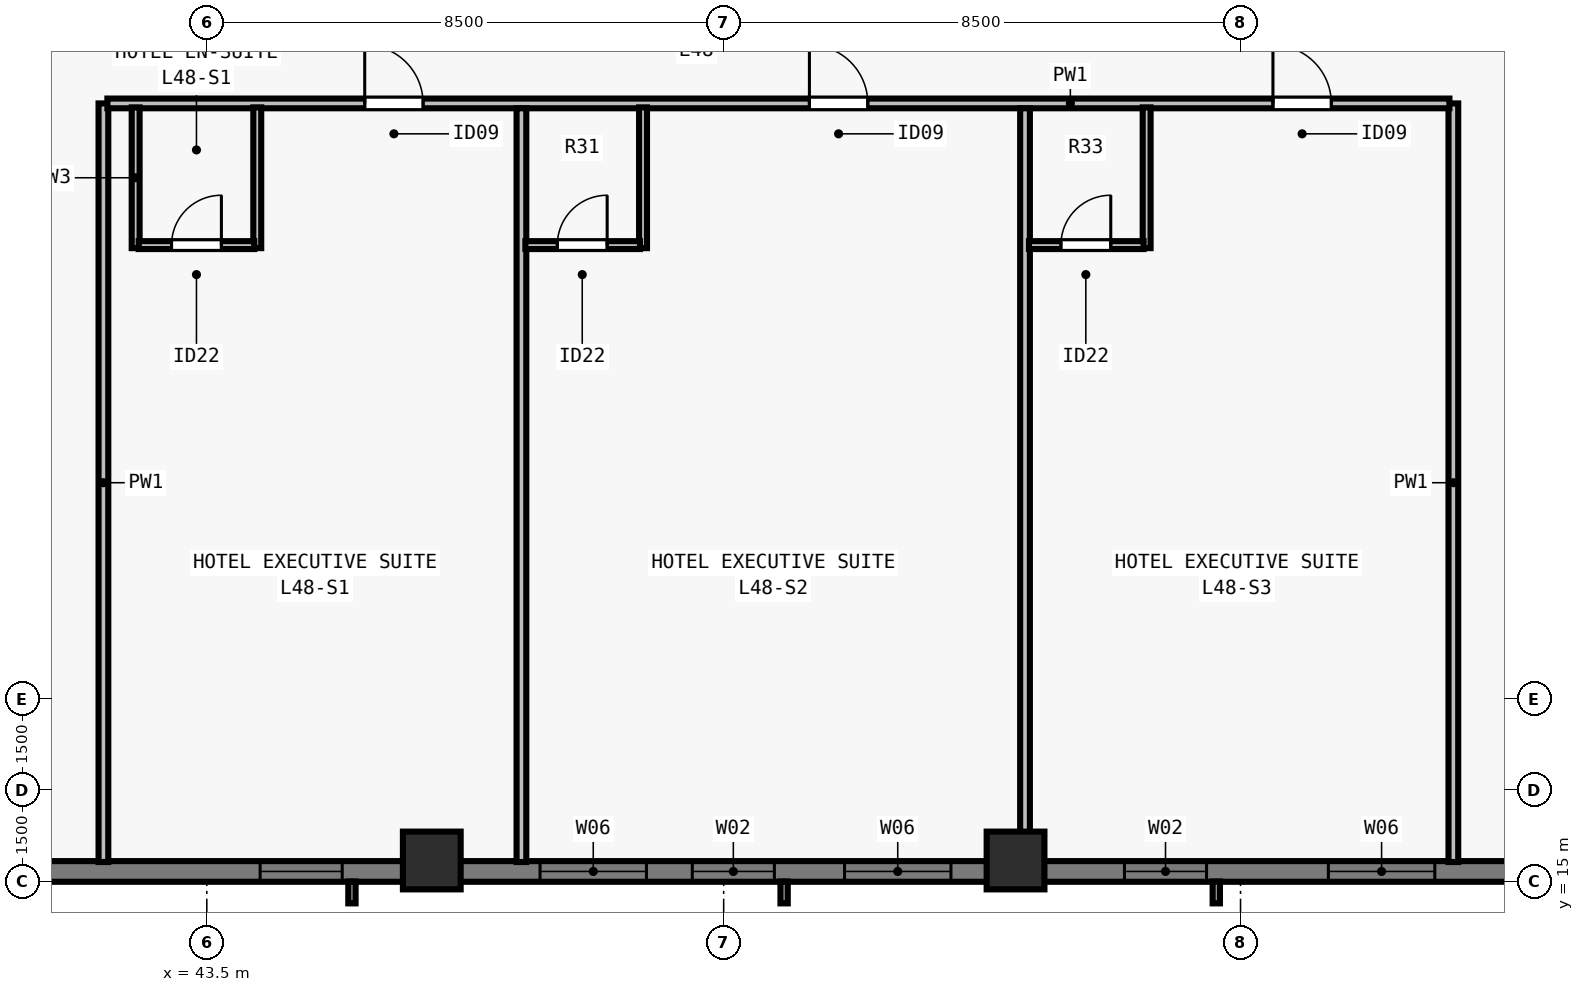
"""IFC4 building model, lengths in metres.
Left out: names, types, materials, properties, quantities, classifications, styles, units other than length and angle.
Written with IfcOpenShell. Run it as: python <this file> out.ifc"""

import sys

from ifc_helpers import new_model, si_unit, direction, frame, frame_2d, origin, origin_2d, place, context, subcontext, project, spatial, rectangle, extrude, element, fill, save


model = new_model("IFC4")
c1 = context("Model", 3, precision=1e-05, world=origin(), true_north=direction((0.0, 1.0)))
c2 = subcontext(c1, "Body", "Model", "MODEL_VIEW")
j1 = project(units=[si_unit("LENGTHUNIT", "METRE"), si_unit("PLANEANGLEUNIT", "RADIAN")], contexts=[c1])
p1 = place(None, origin())
s1 = spatial("IfcSite", under=j1, at=p1, CompositionType="ELEMENT")
p2 = place(p1, origin())
s2 = spatial("IfcBuilding", under=s1, at=p2, CompositionType="ELEMENT")
p3 = place(p2, frame((0.0, 0.0, 176.0)))
s3 = spatial("IfcBuildingStorey", under=s2, at=p3, CompositionType="ELEMENT", Elevation=176.0)
for number, where, z_axis, x_axis in (
    (1, (47.2, 15.35, 0.0), (0.0, 0.0, 1.0), (1.0, 0.0, 0.0)),
    (2, (56.8, 15.35, 0.0), (0.0, 0.0, 1.0), (1.0, 0.0, 0.0)),
):
    element("IfcColumn", number, at=place(p3, frame(where, z_axis=z_axis, x_axis=x_axis)), inside=s3, PredefinedType="COLUMN", context=c2, shape_type="SweptSolid", body=[
        extrude(rectangle(XDim=0.95, YDim=0.95, at=origin_2d()), origin(), (0.0, 0.0, 1.0), 3.5),
    ])
p4 = place(p3, frame((72.0, 15.17, 0.0), z_axis=(0.0, 0.0, 1.0), x_axis=(-1.0, 0.0, 0.0)))
e3 = element("IfcWall", 3, at=p4, inside=s3, PredefinedType="SOLIDWALL", context=c2, shape_type="SweptSolid", body=[
    extrude(rectangle(XDim=39.682, YDim=0.34, at=frame_2d((19.841, 0.0))), origin(), (0.0, 0.0, 1.0), 3.28),
])
p5 = place(p4, frame((4.102, 0.0, 0.8)))
e4 = element("IfcOpeningElement", 4, at=p5, cuts=e3, PredefinedType="OPENING", context=c2, shape_type="SweptSolid", body=[
    extrude(rectangle(XDim=1.35, YDim=1.66, at=frame_2d((0.675, 0.83))), frame((0.0, 0.18, 0.0), z_axis=(0.0, -1.0, 0.0), x_axis=(1.0, 0.0, 0.0)), (0.0, 0.0, 1.0), 0.36),
])
p6 = place(p4, frame((8.305, 0.0, 0.8)))
e5 = element("IfcOpeningElement", 5, at=p6, cuts=e3, PredefinedType="OPENING", context=c2, shape_type="SweptSolid", body=[
    extrude(rectangle(XDim=1.75, YDim=1.66, at=frame_2d((0.875, 0.83))), frame((0.0, 0.18, 0.0), z_axis=(0.0, -1.0, 0.0), x_axis=(1.0, 0.0, 0.0)), (0.0, 0.0, 1.0), 0.36),
])
p7 = place(p4, frame((12.059, 0.0, 0.8)))
e6 = element("IfcOpeningElement", 6, at=p7, cuts=e3, PredefinedType="OPENING", context=c2, shape_type="SweptSolid", body=[
    extrude(rectangle(XDim=1.35, YDim=1.66, at=frame_2d((0.675, 0.83))), frame((0.0, 0.18, 0.0), z_axis=(0.0, -1.0, 0.0), x_axis=(1.0, 0.0, 0.0)), (0.0, 0.0, 1.0), 0.36),
])
p8 = place(p4, frame((16.262, 0.0, 0.8)))
e7 = element("IfcOpeningElement", 7, at=p8, cuts=e3, PredefinedType="OPENING", context=c2, shape_type="SweptSolid", body=[
    extrude(rectangle(XDim=1.75, YDim=1.66, at=frame_2d((0.875, 0.83))), frame((0.0, 0.18, 0.0), z_axis=(0.0, -1.0, 0.0), x_axis=(1.0, 0.0, 0.0)), (0.0, 0.0, 1.0), 0.36),
])
p9 = place(p4, frame((19.166, 0.0, 0.8)))
e8 = element("IfcOpeningElement", 8, at=p9, cuts=e3, PredefinedType="OPENING", context=c2, shape_type="SweptSolid", body=[
    extrude(rectangle(XDim=1.35, YDim=1.66, at=frame_2d((0.675, 0.83))), frame((0.0, 0.18, 0.0), z_axis=(0.0, -1.0, 0.0), x_axis=(1.0, 0.0, 0.0)), (0.0, 0.0, 1.0), 0.36),
])
p10 = place(p4, frame((21.27, 0.0, 0.8)))
e9 = element("IfcOpeningElement", 9, at=p10, cuts=e3, PredefinedType="OPENING", context=c2, shape_type="SweptSolid", body=[
    extrude(rectangle(XDim=1.75, YDim=1.66, at=frame_2d((0.875, 0.83))), frame((0.0, 0.18, 0.0), z_axis=(0.0, -1.0, 0.0), x_axis=(1.0, 0.0, 0.0)), (0.0, 0.0, 1.0), 0.36),
])
p11 = place(p4, frame((26.273, 0.0, 0.8)))
e10 = element("IfcOpeningElement", 10, at=p11, cuts=e3, PredefinedType="OPENING", context=c2, shape_type="SweptSolid", body=[
    extrude(rectangle(XDim=1.35, YDim=1.66, at=frame_2d((0.675, 0.83))), frame((0.0, 0.18, 0.0), z_axis=(0.0, -1.0, 0.0), x_axis=(1.0, 0.0, 0.0)), (0.0, 0.0, 1.0), 0.36),
])
p12 = place(p4, frame((32.93, 0.0, 0.8)))
e11 = element("IfcOpeningElement", 11, at=p12, cuts=e3, PredefinedType="OPENING", context=c2, shape_type="SweptSolid", body=[
    extrude(rectangle(XDim=1.35, YDim=1.66, at=frame_2d((0.675, 0.83))), frame((0.0, 0.18, 0.0), z_axis=(0.0, -1.0, 0.0), x_axis=(1.0, 0.0, 0.0)), (0.0, 0.0, 1.0), 0.36),
])
p13 = place(p3, frame((41.8, 15.325, 0.0), z_axis=(0.0, 0.0, 1.0), x_axis=(0.0, 1.0, 0.0)))
e12 = element("IfcWall", 12, at=p13, inside=s3, PredefinedType="PARTITIONING", context=c2, shape_type="SweptSolid", body=[
    extrude(rectangle(XDim=12.475, YDim=0.16, at=frame_2d((6.238, 0.0))), origin(), (0.0, 0.0, 1.0), 3.28),
])
p14 = place(p3, frame((64.0, 15.325, 0.0), z_axis=(0.0, 0.0, 1.0), x_axis=(0.0, 1.0, 0.0)))
e13 = element("IfcWall", 13, at=p14, inside=s3, PredefinedType="PARTITIONING", context=c2, shape_type="SweptSolid", body=[
    extrude(rectangle(XDim=12.475, YDim=0.16, at=frame_2d((6.238, 0.0))), origin(), (0.0, 0.0, 1.0), 2.555),
])
p15 = place(p3, frame((41.865, 27.8, 0.0), z_axis=(0.0, 0.0, 1.0), x_axis=(1.0, 0.0, 0.0)))
e14 = element("IfcWall", 14, at=p15, inside=s3, PredefinedType="PARTITIONING", context=c2, shape_type="SweptSolid", body=[
    extrude(rectangle(XDim=22.07, YDim=0.16, at=frame_2d((11.035, 0.0))), origin(), (0.0, 0.0, 1.0), 3.28),
])
p16 = place(p15, frame((4.232, 0.0, 0.0)))
e15 = element("IfcOpeningElement", 15, at=p16, cuts=e14, PredefinedType="OPENING", context=c2, shape_type="SweptSolid", body=[
    extrude(rectangle(XDim=0.96, YDim=2.15, at=frame_2d((0.48, 1.075))), frame((0.0, 0.09, 0.0), z_axis=(0.0, -1.0, 0.0), x_axis=(1.0, 0.0, 0.0)), (0.0, 0.0, 1.0), 0.18),
])
p17 = place(p15, frame((11.545, 0.0, 0.0)))
e16 = element("IfcOpeningElement", 16, at=p17, cuts=e14, PredefinedType="OPENING", context=c2, shape_type="SweptSolid", body=[
    extrude(rectangle(XDim=0.96, YDim=2.15, at=frame_2d((0.48, 1.075))), frame((0.0, 0.09, 0.0), z_axis=(0.0, -1.0, 0.0), x_axis=(1.0, 0.0, 0.0)), (0.0, 0.0, 1.0), 0.18),
])
p18 = place(p15, frame((19.168, 0.0, 0.0)))
e17 = element("IfcOpeningElement", 17, at=p18, cuts=e14, PredefinedType="OPENING", context=c2, shape_type="SweptSolid", body=[
    extrude(rectangle(XDim=0.96, YDim=2.15, at=frame_2d((0.48, 1.075))), frame((0.0, 0.09, 0.0), z_axis=(0.0, -1.0, 0.0), x_axis=(1.0, 0.0, 0.0)), (0.0, 0.0, 1.0), 0.18),
])
for number, where, z_axis, x_axis in (
    (18, (42.33, 25.42, 0.0), (0.0, 0.0, 1.0), (0.0, 1.0, 0.0)),
    (19, (44.33, 25.42, 0.0), (0.0, 0.0, 1.0), (0.0, 1.0, 0.0)),
):
    element("IfcWall", number, at=place(p3, frame(where, z_axis=z_axis, x_axis=x_axis)), inside=s3, PredefinedType="PLUMBINGWALL", context=c2, shape_type="SweptSolid", body=[
        extrude(rectangle(XDim=2.315, YDim=0.13, at=frame_2d((1.158, 0.0))), origin(), (0.0, 0.0, 1.0), 3.28),
    ])
p19 = place(p3, frame((42.38, 25.47, 0.0), z_axis=(0.0, 0.0, 1.0), x_axis=(1.0, 0.0, 0.0)))
e20 = element("IfcWall", 20, at=p19, inside=s3, PredefinedType="PLUMBINGWALL", context=c2, shape_type="SweptSolid", body=[
    extrude(rectangle(XDim=1.9, YDim=0.13, at=frame_2d((0.95, 0.0))), origin(), (0.0, 0.0, 1.0), 3.28),
])
p20 = place(p19, frame((0.54, 0.0, 0.0)))
e21 = element("IfcOpeningElement", 21, at=p20, cuts=e20, PredefinedType="OPENING", context=c2, shape_type="SweptSolid", body=[
    extrude(rectangle(XDim=0.82, YDim=2.1, at=frame_2d((0.41, 1.05))), frame((0.0, 0.075, 0.0), z_axis=(0.0, -1.0, 0.0), x_axis=(1.0, 0.0, 0.0)), (0.0, 0.0, 1.0), 0.15),
])
p21 = place(p3, frame((48.674, 15.325, 0.0), z_axis=(0.0, 0.0, 1.0), x_axis=(0.0, 1.0, 0.0)))
e22 = element("IfcWall", 22, at=p21, inside=s3, PredefinedType="PARTITIONING", context=c2, shape_type="SweptSolid", body=[
    extrude(rectangle(XDim=12.395, YDim=0.16, at=frame_2d((6.198, 0.0))), origin(), (0.0, 0.0, 1.0), 2.896),
])
p22 = place(p3, frame((50.674, 25.42, 0.0), z_axis=(0.0, 0.0, 1.0), x_axis=(0.0, 1.0, 0.0)))
e23 = element("IfcWall", 23, at=p22, inside=s3, PredefinedType="PLUMBINGWALL", context=c2, shape_type="SweptSolid", body=[
    extrude(rectangle(XDim=2.315, YDim=0.13, at=frame_2d((1.158, 0.0))), origin(), (0.0, 0.0, 1.0), 3.28),
])
p23 = place(p3, frame((48.739, 25.47, 0.0), z_axis=(0.0, 0.0, 1.0), x_axis=(1.0, 0.0, 0.0)))
e24 = element("IfcWall", 24, at=p23, inside=s3, PredefinedType="PLUMBINGWALL", context=c2, shape_type="SweptSolid", body=[
    extrude(rectangle(XDim=1.885, YDim=0.13, at=frame_2d((0.942, 0.0))), origin(), (0.0, 0.0, 1.0), 3.28),
])
p24 = place(p23, frame((0.525, 0.0, 0.0)))
e25 = element("IfcOpeningElement", 25, at=p24, cuts=e24, PredefinedType="OPENING", context=c2, shape_type="SweptSolid", body=[
    extrude(rectangle(XDim=0.82, YDim=2.1, at=frame_2d((0.41, 1.05))), frame((0.0, 0.075, 0.0), z_axis=(0.0, -1.0, 0.0), x_axis=(1.0, 0.0, 0.0)), (0.0, 0.0, 1.0), 0.15),
])
p25 = place(p3, frame((56.956, 15.325, 0.0), z_axis=(0.0, 0.0, 1.0), x_axis=(0.0, 1.0, 0.0)))
e26 = element("IfcWall", 26, at=p25, inside=s3, PredefinedType="PARTITIONING", context=c2, shape_type="SweptSolid", body=[
    extrude(rectangle(XDim=12.395, YDim=0.16, at=frame_2d((6.198, 0.0))), origin(), (0.0, 0.0, 1.0), 2.555),
])
p26 = place(p3, frame((58.956, 25.42, 0.0), z_axis=(0.0, 0.0, 1.0), x_axis=(0.0, 1.0, 0.0)))
e27 = element("IfcWall", 27, at=p26, inside=s3, PredefinedType="PLUMBINGWALL", context=c2, shape_type="SweptSolid", body=[
    extrude(rectangle(XDim=2.315, YDim=0.13, at=frame_2d((1.158, 0.0))), origin(), (0.0, 0.0, 1.0), 3.28),
])
p27 = place(p3, frame((57.021, 25.47, 0.0), z_axis=(0.0, 0.0, 1.0), x_axis=(1.0, 0.0, 0.0)))
e28 = element("IfcWall", 28, at=p27, inside=s3, PredefinedType="PLUMBINGWALL", context=c2, shape_type="SweptSolid", body=[
    extrude(rectangle(XDim=1.885, YDim=0.13, at=frame_2d((0.942, 0.0))), origin(), (0.0, 0.0, 1.0), 3.28),
])
p28 = place(p27, frame((0.525, 0.0, 0.0)))
e29 = element("IfcOpeningElement", 29, at=p28, cuts=e28, PredefinedType="OPENING", context=c2, shape_type="SweptSolid", body=[
    extrude(rectangle(XDim=0.82, YDim=2.1, at=frame_2d((0.41, 1.05))), frame((0.0, 0.075, 0.0), z_axis=(0.0, -1.0, 0.0), x_axis=(1.0, 0.0, 0.0)), (0.0, 0.0, 1.0), 0.15),
])
p29 = place(p6, origin())
e30 = element("IfcWindow", 30, at=p29, inside=s3, PartitioningType="SINGLE_PANEL", PredefinedType="WINDOW", context=c2, shape_type="SweptSolid", body=[
    extrude(rectangle(XDim=1.75, YDim=1.66, at=frame_2d((0.875, 0.83))), frame((0.0, -0.05, 0.0), z_axis=(0.0, -1.0, 0.0), x_axis=(1.0, 0.0, 0.0)), (0.0, 0.0, 1.0), 0.06),
])
fill(e5, e30)
p30 = place(p7, origin())
e31 = element("IfcWindow", 31, at=p30, inside=s3, PartitioningType="SINGLE_PANEL", PredefinedType="WINDOW", context=c2, shape_type="SweptSolid", body=[
    extrude(rectangle(XDim=1.35, YDim=1.66, at=frame_2d((0.675, 0.83))), frame((0.0, -0.05, 0.0), z_axis=(0.0, -1.0, 0.0), x_axis=(1.0, 0.0, 0.0)), (0.0, 0.0, 1.0), 0.06),
])
fill(e6, e31)
p31 = place(p8, origin())
e32 = element("IfcWindow", 32, at=p31, inside=s3, PartitioningType="SINGLE_PANEL", PredefinedType="WINDOW", context=c2, shape_type="SweptSolid", body=[
    extrude(rectangle(XDim=1.75, YDim=1.66, at=frame_2d((0.875, 0.83))), frame((0.0, -0.05, 0.0), z_axis=(0.0, -1.0, 0.0), x_axis=(1.0, 0.0, 0.0)), (0.0, 0.0, 1.0), 0.06),
])
fill(e7, e32)
p32 = place(p9, origin())
e33 = element("IfcWindow", 33, at=p32, inside=s3, PartitioningType="SINGLE_PANEL", PredefinedType="WINDOW", context=c2, shape_type="SweptSolid", body=[
    extrude(rectangle(XDim=1.35, YDim=1.66, at=frame_2d((0.675, 0.83))), frame((0.0, -0.05, 0.0), z_axis=(0.0, -1.0, 0.0), x_axis=(1.0, 0.0, 0.0)), (0.0, 0.0, 1.0), 0.06),
])
fill(e8, e33)
p33 = place(p10, origin())
e34 = element("IfcWindow", 34, at=p33, inside=s3, PartitioningType="SINGLE_PANEL", PredefinedType="WINDOW", context=c2, shape_type="SweptSolid", body=[
    extrude(rectangle(XDim=1.75, YDim=1.66, at=frame_2d((0.875, 0.83))), frame((0.0, -0.05, 0.0), z_axis=(0.0, -1.0, 0.0), x_axis=(1.0, 0.0, 0.0)), (0.0, 0.0, 1.0), 0.06),
])
fill(e9, e34)
p34 = place(p11, origin())
e35 = element("IfcWindow", 35, at=p34, inside=s3, PartitioningType="SINGLE_PANEL", PredefinedType="WINDOW", context=c2, shape_type="SweptSolid", body=[
    extrude(rectangle(XDim=1.35, YDim=1.66, at=frame_2d((0.675, 0.83))), frame((0.0, -0.05, 0.0), z_axis=(0.0, -1.0, 0.0), x_axis=(1.0, 0.0, 0.0)), (0.0, 0.0, 1.0), 0.06),
])
fill(e10, e35)
p35 = place(p20, origin())
e36 = element("IfcDoor", 36, at=p35, inside=s3, OperationType="SINGLE_SWING_RIGHT", PredefinedType="DOOR", context=c2, shape_type="SweptSolid", body=[
    extrude(rectangle(XDim=0.82, YDim=2.1, at=frame_2d((0.41, 1.05))), frame((0.0, 0.025, 0.0), z_axis=(0.0, -1.0, 0.0), x_axis=(1.0, 0.0, 0.0)), (0.0, 0.0, 1.0), 0.05),
])
fill(e21, e36)
p36 = place(p16, origin())
e37 = element("IfcDoor", 37, at=p36, inside=s3, OperationType="SINGLE_SWING_LEFT", PredefinedType="DOOR", context=c2, shape_type="SweptSolid", body=[
    extrude(rectangle(XDim=0.96, YDim=2.15, at=frame_2d((0.48, 1.075))), frame((0.0, 0.025, 0.0), z_axis=(0.0, -1.0, 0.0), x_axis=(1.0, 0.0, 0.0)), (0.0, 0.0, 1.0), 0.05),
])
fill(e15, e37)
p37 = place(p24, origin())
e38 = element("IfcDoor", 38, at=p37, inside=s3, OperationType="SINGLE_SWING_RIGHT", PredefinedType="DOOR", context=c2, shape_type="SweptSolid", body=[
    extrude(rectangle(XDim=0.82, YDim=2.1, at=frame_2d((0.41, 1.05))), frame((0.0, 0.025, 0.0), z_axis=(0.0, -1.0, 0.0), x_axis=(1.0, 0.0, 0.0)), (0.0, 0.0, 1.0), 0.05),
])
fill(e25, e38)
p38 = place(p17, origin())
e39 = element("IfcDoor", 39, at=p38, inside=s3, OperationType="SINGLE_SWING_LEFT", PredefinedType="DOOR", context=c2, shape_type="SweptSolid", body=[
    extrude(rectangle(XDim=0.96, YDim=2.15, at=frame_2d((0.48, 1.075))), frame((0.0, 0.025, 0.0), z_axis=(0.0, -1.0, 0.0), x_axis=(1.0, 0.0, 0.0)), (0.0, 0.0, 1.0), 0.05),
])
fill(e16, e39)
p39 = place(p28, origin())
e40 = element("IfcDoor", 40, at=p39, inside=s3, OperationType="SINGLE_SWING_RIGHT", PredefinedType="DOOR", context=c2, shape_type="SweptSolid", body=[
    extrude(rectangle(XDim=0.82, YDim=2.1, at=frame_2d((0.41, 1.05))), frame((0.0, 0.025, 0.0), z_axis=(0.0, -1.0, 0.0), x_axis=(1.0, 0.0, 0.0)), (0.0, 0.0, 1.0), 0.05),
])
fill(e29, e40)
p40 = place(p18, origin())
e41 = element("IfcDoor", 41, at=p40, inside=s3, OperationType="SINGLE_SWING_LEFT", PredefinedType="DOOR", context=c2, shape_type="SweptSolid", body=[
    extrude(rectangle(XDim=0.96, YDim=2.15, at=frame_2d((0.48, 1.075))), frame((0.0, 0.025, 0.0), z_axis=(0.0, -1.0, 0.0), x_axis=(1.0, 0.0, 0.0)), (0.0, 0.0, 1.0), 0.05),
])
fill(e17, e41)
save(model, sys.argv[1])
